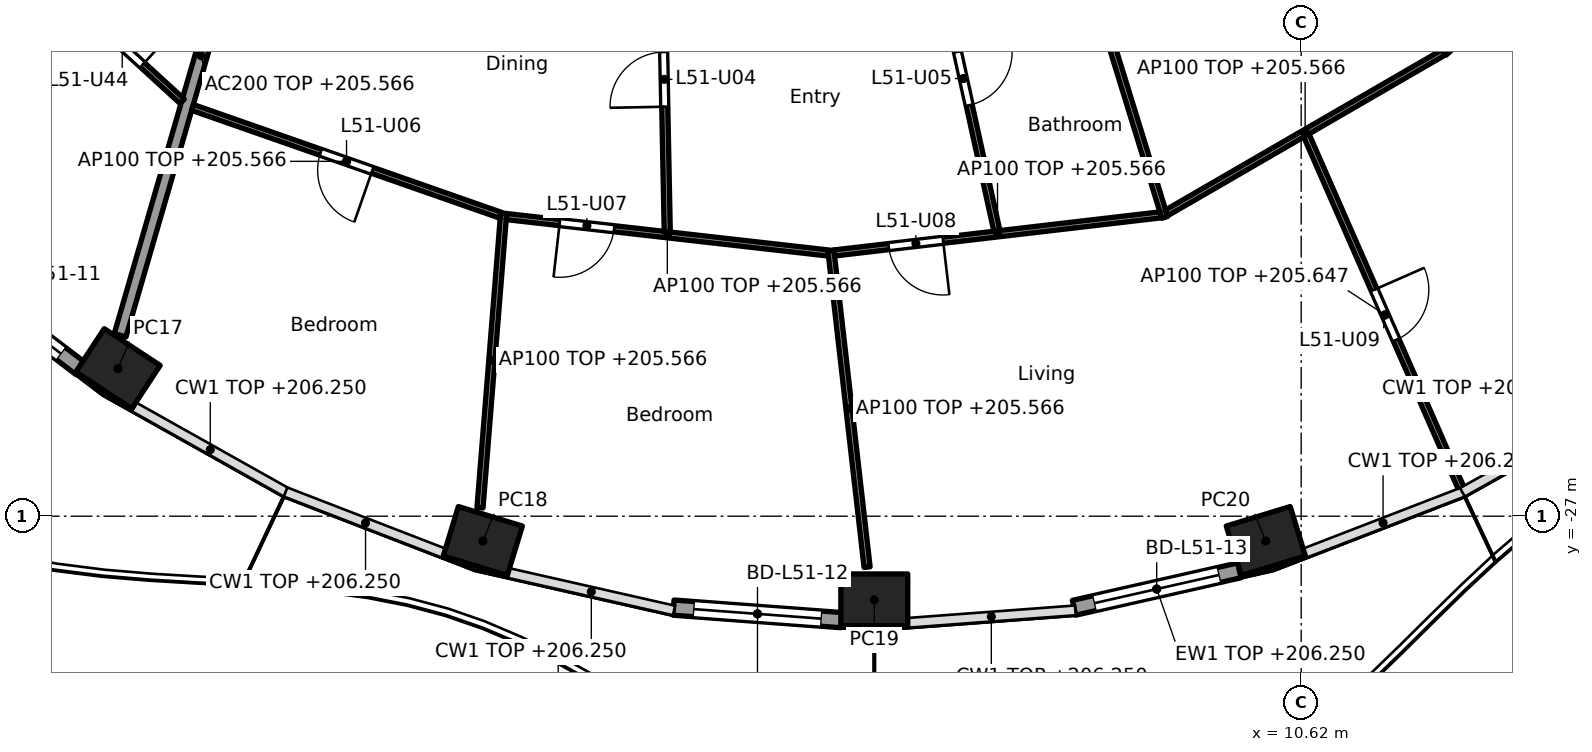
"""IFC4 building model, lengths in metres.
Left out: names, types, materials, properties, quantities, classifications, styles, units other than length and angle.
Written with IfcOpenShell. Run it as: python <this file> out.ifc"""

import sys

from ifc_helpers import new_model, si_unit, direction, frame, frame_2d, origin, origin_2d, place, context, subcontext, project, spatial, rectangle, hollow_rectangle, extrude, element, fill, save


model = new_model("IFC4")
c1 = context("Model", 3, precision=1e-05, world=origin(), true_north=direction((0.0, 1.0)))
c2 = subcontext(c1, "Body", "Model", "MODEL_VIEW")
j1 = project(units=[si_unit("LENGTHUNIT", "METRE"), si_unit("PLANEANGLEUNIT", "RADIAN")], contexts=[c1])
p1 = place(None, origin())
s1 = spatial("IfcSite", under=j1, at=p1, CompositionType="ELEMENT")
p2 = place(p1, origin())
s2 = spatial("IfcBuilding", under=s1, at=p2, CompositionType="ELEMENT")
p3 = place(p2, frame((0.0, 0.0, 202.9)))
s3 = spatial("IfcBuildingStorey", under=s2, at=p3, CompositionType="ELEMENT", Elevation=202.9)
for number, where, z_axis, x_axis in (
    (1, (-8.837, -24.573, 0.0), (0.0, 0.0, 1.0), (0.836, -0.549, 0.0)),
    (2, (-2.838, -27.408, 0.0), (0.0, 0.0, 1.0), (0.957, -0.292, 0.0)),
    (3, (3.6, -28.375, 0.0), (0.0, 0.0, 1.0), (1.0, 0.0, 0.0)),
    (4, (10.038, -27.408, 0.0), (0.0, 0.0, 1.0), (0.957, 0.292, 0.0)),
):
    element("IfcColumn", number, at=place(p3, frame(where, z_axis=z_axis, x_axis=x_axis)), inside=s3, PredefinedType="COLUMN", context=c2, shape_type="SweptSolid", body=[
        extrude(hollow_rectangle(XDim=1.1, YDim=0.85, WallThickness=0.036, at=origin_2d()), origin(), (0.0, 0.0, 1.0), 3.7),
    ])
p4 = place(p3, frame((-9.45, -24.574, 0.0), z_axis=(0.0, 0.0, 1.0), x_axis=(-0.796055733703, 0.60522332146, 0.0)))
e5 = element("IfcWall", 5, at=p4, inside=s3, PredefinedType="SOLIDWALL", context=c2, shape_type="SweptSolid", body=[
    extrude(rectangle(XDim=2.917, YDim=0.25, at=frame_2d((1.458, 0.0))), origin(), (0.0, 0.0, 1.0), 3.35),
])
p5 = place(p4, frame((0.408, 0.0, 0.0)))
e6 = element("IfcOpeningElement", 6, at=p5, cuts=e5, PredefinedType="OPENING", context=c2, shape_type="SweptSolid", body=[
    extrude(rectangle(XDim=2.1, YDim=2.4, at=frame_2d((1.05, 1.2))), frame((0.0, 0.135, 0.0), z_axis=(0.0, -1.0, 0.0), x_axis=(1.0, 0.0, 0.0)), (0.0, 0.0, 1.0), 0.27),
])
p6 = place(p3, frame((3.061, -28.709, 0.0), z_axis=(0.0, 0.0, 1.0), x_axis=(-0.997232064422, 0.074351931305, 0.0)))
e7 = element("IfcWall", 7, at=p6, inside=s3, PredefinedType="SOLIDWALL", context=c2, shape_type="SweptSolid", body=[
    extrude(rectangle(XDim=2.771, YDim=0.25, at=frame_2d((1.386, 0.0))), origin(), (0.0, 0.0, 1.0), 3.35),
])
p7 = place(p6, frame((0.336, 0.0, 0.0)))
e8 = element("IfcOpeningElement", 8, at=p7, cuts=e7, PredefinedType="OPENING", context=c2, shape_type="SweptSolid", body=[
    extrude(rectangle(XDim=2.1, YDim=2.4, at=frame_2d((1.05, 1.2))), frame((0.0, 0.135, 0.0), z_axis=(0.0, -1.0, 0.0), x_axis=(1.0, 0.0, 0.0)), (0.0, 0.0, 1.0), 0.27),
])
p8 = place(p3, frame((9.604, -27.891, 0.0), z_axis=(0.0, 0.0, 1.0), x_axis=(-0.975324329911, -0.220776926974, 0.0)))
e9 = element("IfcWall", 9, at=p8, inside=s3, PredefinedType="SOLIDWALL", context=c2, shape_type="SweptSolid", body=[
    extrude(rectangle(XDim=2.788, YDim=0.25, at=frame_2d((1.394, 0.0))), origin(), (0.0, 0.0, 1.0), 3.35),
])
p9 = place(p8, frame((0.344, 0.0, 0.0)))
e10 = element("IfcOpeningElement", 10, at=p9, cuts=e9, PredefinedType="OPENING", context=c2, shape_type="SweptSolid", body=[
    extrude(rectangle(XDim=2.1, YDim=2.4, at=frame_2d((1.05, 1.2))), frame((0.0, 0.135, 0.0), z_axis=(0.0, -1.0, 0.0), x_axis=(1.0, 0.0, 0.0)), (0.0, 0.0, 1.0), 0.27),
])
p10 = place(p3, frame((-6.137, -14.83, 0.0), z_axis=(0.0, 0.0, 1.0), x_axis=(-0.278461169897, -0.96044748782, 0.0)))
e11 = element("IfcWall", 11, at=p10, inside=s3, PredefinedType="PARTITIONING", context=c2, shape_type="SweptSolid", body=[
    extrude(rectangle(XDim=9.573, YDim=0.2, at=frame_2d((4.787, 0.0))), origin(), (0.0, 0.0, 1.0), 2.666),
])
p11 = place(p3, frame((-11.766, -16.535, 0.0), z_axis=(0.0, 0.0, 1.0), x_axis=(0.73807320557, -0.674720640872, 0.0)))
e12 = element("IfcWall", 12, at=p11, inside=s3, PredefinedType="PARTITIONING", context=c2, shape_type="SweptSolid", body=[
    extrude(rectangle(XDim=5.399, YDim=0.1, at=frame_2d((2.699, 0.0))), origin(), (0.0, 0.0, 1.0), 2.666),
])
p12 = place(p11, frame((3.612, 0.0, 0.0)))
e13 = element("IfcOpeningElement", 13, at=p12, cuts=e12, PredefinedType="OPENING", context=c2, shape_type="SweptSolid", body=[
    extrude(rectangle(XDim=0.9, YDim=2.1, at=frame_2d((0.45, 1.05))), frame((0.0, 0.06, 0.0), z_axis=(0.0, -1.0, 0.0), x_axis=(1.0, 0.0, 0.0)), (0.0, 0.0, 1.0), 0.12),
])
p13 = place(p3, frame((-7.613, -20.278, 0.0), z_axis=(0.0, 0.0, 1.0), x_axis=(0.94391294884, -0.330194404878, 0.0)))
e14 = element("IfcWall", 14, at=p13, inside=s3, PredefinedType="PARTITIONING", context=c2, shape_type="SweptSolid", body=[
    extrude(rectangle(XDim=5.367, YDim=0.1, at=frame_2d((2.684, 0.0))), origin(), (0.0, 0.0, 1.0), 2.666),
])
p14 = place(p13, frame((2.234, 0.0, 0.0)))
e15 = element("IfcOpeningElement", 15, at=p14, cuts=e14, PredefinedType="OPENING", context=c2, shape_type="SweptSolid", body=[
    extrude(rectangle(XDim=0.9, YDim=2.1, at=frame_2d((0.45, 1.05))), frame((0.0, 0.06, 0.0), z_axis=(0.0, -1.0, 0.0), x_axis=(1.0, 0.0, 0.0)), (0.0, 0.0, 1.0), 0.12),
])
p15 = place(p3, frame((-2.495, -22.017, 0.0), z_axis=(0.0, 0.0, 1.0), x_axis=(-0.080150660566, -0.99678276049, 0.0)))
e16 = element("IfcWall", 16, at=p15, inside=s3, PredefinedType="PARTITIONING", context=c2, shape_type="SweptSolid", body=[
    extrude(rectangle(XDim=4.858, YDim=0.1, at=frame_2d((2.429, 0.0))), origin(), (0.0, 0.0, 1.0), 2.666),
])
p16 = place(p3, frame((-2.449, -22.073, 0.0), z_axis=(0.0, 0.0, 1.0), x_axis=(0.993660315081, -0.112424099879, 0.0)))
e17 = element("IfcWall", 17, at=p16, inside=s3, PredefinedType="PARTITIONING", context=c2, shape_type="SweptSolid", body=[
    extrude(rectangle(XDim=5.325, YDim=0.1, at=frame_2d((2.662, 0.0))), origin(), (0.0, 0.0, 1.0), 2.666),
])
p17 = place(p16, frame((0.881, 0.0, 0.0)))
e18 = element("IfcOpeningElement", 18, at=p17, cuts=e17, PredefinedType="OPENING", context=c2, shape_type="SweptSolid", body=[
    extrude(rectangle(XDim=0.9, YDim=2.1, at=frame_2d((0.45, 1.05))), frame((0.0, 0.06, 0.0), z_axis=(0.0, -1.0, 0.0), x_axis=(1.0, 0.0, 0.0)), (0.0, 0.0, 1.0), 0.12),
])
p18 = place(p3, frame((0.002, -12.665, 0.0), z_axis=(0.0, 0.0, 1.0), x_axis=(0.019992969345, -0.999800120613, 0.0)))
e19 = element("IfcWall", 19, at=p18, inside=s3, PredefinedType="PARTITIONING", context=c2, shape_type="SweptSolid", body=[
    extrude(rectangle(XDim=9.659, YDim=0.1, at=frame_2d((4.83, 0.0))), origin(), (0.0, 0.0, 1.0), 2.515),
])
p19 = place(p18, frame((1.873, 0.0, 0.0)))
e20 = element("IfcOpeningElement", 20, at=p19, cuts=e19, PredefinedType="OPENING", context=c2, shape_type="SweptSolid", body=[
    extrude(rectangle(XDim=0.9, YDim=2.1, at=frame_2d((0.45, 1.05))), frame((0.0, 0.06, 0.0), z_axis=(0.0, -1.0, 0.0), x_axis=(1.0, 0.0, 0.0)), (0.0, 0.0, 1.0), 0.12),
])
p20 = place(p18, frame((6.703, 0.0, 0.0)))
e21 = element("IfcOpeningElement", 21, at=p20, cuts=e19, PredefinedType="OPENING", context=c2, shape_type="SweptSolid", body=[
    extrude(rectangle(XDim=0.9, YDim=2.1, at=frame_2d((0.45, 1.05))), frame((0.0, 0.06, 0.0), z_axis=(0.0, -1.0, 0.0), x_axis=(1.0, 0.0, 0.0)), (0.0, 0.0, 1.0), 0.12),
])
p21 = place(p3, frame((2.885, -22.627, 0.0), z_axis=(0.0, 0.0, 1.0), x_axis=(0.113634556485, -0.993522615531, 0.0)))
e22 = element("IfcWall", 22, at=p21, inside=s3, PredefinedType="PARTITIONING", context=c2, shape_type="SweptSolid", body=[
    extrude(rectangle(XDim=5.244, YDim=0.1, at=frame_2d((2.622, 0.0))), origin(), (0.0, 0.0, 1.0), 2.666),
])
p22 = place(p3, frame((2.941, -22.671, 0.0), z_axis=(0.0, 0.0, 1.0), x_axis=(0.993245806382, 0.1160291692, 0.0)))
e23 = element("IfcWall", 23, at=p22, inside=s3, PredefinedType="PARTITIONING", context=c2, shape_type="SweptSolid", body=[
    extrude(rectangle(XDim=5.408, YDim=0.1, at=frame_2d((2.704, 0.0))), origin(), (0.0, 0.0, 1.0), 2.666),
])
p23 = place(p22, frame((0.902, 0.0, 0.0)))
e24 = element("IfcOpeningElement", 24, at=p23, cuts=e23, PredefinedType="OPENING", context=c2, shape_type="SweptSolid", body=[
    extrude(rectangle(XDim=0.9, YDim=2.1, at=frame_2d((0.45, 1.05))), frame((0.0, 0.06, 0.0), z_axis=(0.0, -1.0, 0.0), x_axis=(1.0, 0.0, 0.0)), (0.0, 0.0, 1.0), 0.12),
])
p24 = place(p3, frame((3.491, -12.662, 0.0), z_axis=(0.0, 0.0, 1.0), x_axis=(0.215082442833, -0.976595895335, 0.0)))
e25 = element("IfcWall", 25, at=p24, inside=s3, PredefinedType="PARTITIONING", context=c2, shape_type="SweptSolid", body=[
    extrude(rectangle(XDim=9.878, YDim=0.1, at=frame_2d((4.939, 0.0))), origin(), (0.0, 0.0, 1.0), 2.515),
])
p25 = place(p24, frame((0.35, 0.0, 0.0)))
e26 = element("IfcOpeningElement", 26, at=p25, cuts=e25, PredefinedType="OPENING", context=c2, shape_type="SweptSolid", body=[
    extrude(rectangle(XDim=0.9, YDim=2.1, at=frame_2d((0.45, 1.05))), frame((0.0, 0.06, 0.0), z_axis=(0.0, -1.0, 0.0), x_axis=(1.0, 0.0, 0.0)), (0.0, 0.0, 1.0), 0.12),
])
p26 = place(p24, frame((6.861, 0.0, 0.0)))
e27 = element("IfcOpeningElement", 27, at=p26, cuts=e25, PredefinedType="OPENING", context=c2, shape_type="SweptSolid", body=[
    extrude(rectangle(XDim=0.9, YDim=2.1, at=frame_2d((0.45, 1.05))), frame((0.0, 0.06, 0.0), z_axis=(0.0, -1.0, 0.0), x_axis=(1.0, 0.0, 0.0)), (0.0, 0.0, 1.0), 0.12),
])
p27 = place(p3, frame((6.138, -14.83, 0.0), z_axis=(0.0, 0.0, 1.0), x_axis=(0.294822274121, -0.955552105687, 0.0)))
e28 = element("IfcWall", 28, at=p27, inside=s3, PredefinedType="PARTITIONING", context=c2, shape_type="SweptSolid", body=[
    extrude(rectangle(XDim=7.594, YDim=0.1, at=frame_2d((3.797, 0.0))), origin(), (0.0, 0.0, 1.0), 3.35),
])
p28 = place(p3, frame((8.405, -22.013, 0.0), z_axis=(0.0, 0.0, 1.0), x_axis=(0.865277177388, 0.501293732547, 0.0)))
e29 = element("IfcWall", 29, at=p28, inside=s3, PredefinedType="PARTITIONING", context=c2, shape_type="SweptSolid", body=[
    extrude(rectangle(XDim=5.27, YDim=0.1, at=frame_2d((2.635, 0.0))), origin(), (0.0, 0.0, 1.0), 2.666),
])
p29 = place(p3, frame((10.705, -20.738, 0.0), z_axis=(0.0, 0.0, 1.0), x_axis=(0.401740633891, -0.915753494714, 0.0)))
e30 = element("IfcWall", 30, at=p29, inside=s3, PredefinedType="PARTITIONING", context=c2, shape_type="SweptSolid", body=[
    extrude(rectangle(XDim=6.445, YDim=0.1, at=frame_2d((3.223, 0.0))), origin(), (0.0, 0.0, 1.0), 2.747),
])
p30 = place(p29, frame((2.773, 0.0, 0.0)))
e31 = element("IfcOpeningElement", 31, at=p30, cuts=e30, PredefinedType="OPENING", context=c2, shape_type="SweptSolid", body=[
    extrude(rectangle(XDim=0.9, YDim=2.1, at=frame_2d((0.45, 1.05))), frame((0.0, 0.06, 0.0), z_axis=(0.0, -1.0, 0.0), x_axis=(1.0, 0.0, 0.0)), (0.0, 0.0, 1.0), 0.12),
])
p31 = place(p3, frame((12.971, -19.38, 0.0), z_axis=(0.0, 0.0, 1.0), x_axis=(0.742768881471, 0.669547898748, 0.0)))
e32 = element("IfcWall", 32, at=p31, inside=s3, PredefinedType="PARTITIONING", context=c2, shape_type="SweptSolid", body=[
    extrude(rectangle(XDim=5.642, YDim=0.1, at=frame_2d((2.821, 0.0))), origin(), (0.0, 0.0, 1.0), 2.666),
])
p32 = place(p31, frame((1.01, 0.0, 0.0)))
e33 = element("IfcOpeningElement", 33, at=p32, cuts=e32, PredefinedType="OPENING", context=c2, shape_type="SweptSolid", body=[
    extrude(rectangle(XDim=0.9, YDim=2.1, at=frame_2d((0.45, 1.05))), frame((0.0, 0.06, 0.0), z_axis=(0.0, -1.0, 0.0), x_axis=(1.0, 0.0, 0.0)), (0.0, 0.0, 1.0), 0.12),
])
p33 = place(p31, frame((3.806, 0.0, 0.0)))
e34 = element("IfcOpeningElement", 34, at=p33, cuts=e32, PredefinedType="OPENING", context=c2, shape_type="SweptSolid", body=[
    extrude(rectangle(XDim=0.9, YDim=2.1, at=frame_2d((0.45, 1.05))), frame((0.0, 0.06, 0.0), z_axis=(0.0, -1.0, 0.0), x_axis=(1.0, 0.0, 0.0)), (0.0, 0.0, 1.0), 0.12),
])
p34 = place(p5, origin())
e35 = element("IfcDoor", 35, at=p34, inside=s3, OperationType="SLIDING_TO_LEFT", PredefinedType="DOOR", context=c2, shape_type="SweptSolid", body=[
    extrude(rectangle(XDim=2.1, YDim=2.4, at=frame_2d((1.05, 1.2))), frame((0.0, 0.025, 0.0), z_axis=(0.0, -1.0, 0.0), x_axis=(1.0, 0.0, 0.0)), (0.0, 0.0, 1.0), 0.05),
])
fill(e6, e35)
p35 = place(p7, origin())
e36 = element("IfcDoor", 36, at=p35, inside=s3, OperationType="SLIDING_TO_LEFT", PredefinedType="DOOR", context=c2, shape_type="SweptSolid", body=[
    extrude(rectangle(XDim=2.1, YDim=2.4, at=frame_2d((1.05, 1.2))), frame((0.0, 0.025, 0.0), z_axis=(0.0, -1.0, 0.0), x_axis=(1.0, 0.0, 0.0)), (0.0, 0.0, 1.0), 0.05),
])
fill(e8, e36)
p36 = place(p9, origin())
e37 = element("IfcDoor", 37, at=p36, inside=s3, OperationType="SLIDING_TO_LEFT", PredefinedType="DOOR", context=c2, shape_type="SweptSolid", body=[
    extrude(rectangle(XDim=2.1, YDim=2.4, at=frame_2d((1.05, 1.2))), frame((0.0, 0.025, 0.0), z_axis=(0.0, -1.0, 0.0), x_axis=(1.0, 0.0, 0.0)), (0.0, 0.0, 1.0), 0.05),
])
fill(e10, e37)
p37 = place(p20, frame((0.9, 0.0, 0.0), x_axis=(-1.0, 0.0, 0.0)))
e38 = element("IfcDoor", 38, at=p37, inside=s3, OperationType="SINGLE_SWING_LEFT", PredefinedType="DOOR", context=c2, shape_type="SweptSolid", body=[
    extrude(rectangle(XDim=0.9, YDim=2.1, at=frame_2d((0.45, 1.05))), frame((0.0, 0.025, 0.0), z_axis=(0.0, -1.0, 0.0), x_axis=(1.0, 0.0, 0.0)), (0.0, 0.0, 1.0), 0.05),
])
fill(e21, e38)
p38 = place(p26, origin())
e39 = element("IfcDoor", 39, at=p38, inside=s3, OperationType="SINGLE_SWING_LEFT", PredefinedType="DOOR", context=c2, shape_type="SweptSolid", body=[
    extrude(rectangle(XDim=0.9, YDim=2.1, at=frame_2d((0.45, 1.05))), frame((0.0, 0.025, 0.0), z_axis=(0.0, -1.0, 0.0), x_axis=(1.0, 0.0, 0.0)), (0.0, 0.0, 1.0), 0.05),
])
fill(e27, e39)
p39 = place(p14, frame((0.9, 0.0, 0.0), x_axis=(-1.0, 0.0, 0.0)))
e40 = element("IfcDoor", 40, at=p39, inside=s3, OperationType="SINGLE_SWING_LEFT", PredefinedType="DOOR", context=c2, shape_type="SweptSolid", body=[
    extrude(rectangle(XDim=0.9, YDim=2.1, at=frame_2d((0.45, 1.05))), frame((0.0, 0.025, 0.0), z_axis=(0.0, -1.0, 0.0), x_axis=(1.0, 0.0, 0.0)), (0.0, 0.0, 1.0), 0.05),
])
fill(e15, e40)
p40 = place(p17, frame((0.9, 0.0, 0.0), x_axis=(-1.0, 0.0, 0.0)))
e41 = element("IfcDoor", 41, at=p40, inside=s3, OperationType="SINGLE_SWING_RIGHT", PredefinedType="DOOR", context=c2, shape_type="SweptSolid", body=[
    extrude(rectangle(XDim=0.9, YDim=2.1, at=frame_2d((0.45, 1.05))), frame((0.0, 0.025, 0.0), z_axis=(0.0, -1.0, 0.0), x_axis=(1.0, 0.0, 0.0)), (0.0, 0.0, 1.0), 0.05),
])
fill(e18, e41)
p41 = place(p23, frame((0.9, 0.0, 0.0), x_axis=(-1.0, 0.0, 0.0)))
e42 = element("IfcDoor", 42, at=p41, inside=s3, OperationType="SINGLE_SWING_LEFT", PredefinedType="DOOR", context=c2, shape_type="SweptSolid", body=[
    extrude(rectangle(XDim=0.9, YDim=2.1, at=frame_2d((0.45, 1.05))), frame((0.0, 0.025, 0.0), z_axis=(0.0, -1.0, 0.0), x_axis=(1.0, 0.0, 0.0)), (0.0, 0.0, 1.0), 0.05),
])
fill(e24, e42)
p42 = place(p30, origin())
e43 = element("IfcDoor", 43, at=p42, inside=s3, OperationType="SINGLE_SWING_LEFT", PredefinedType="DOOR", context=c2, shape_type="SweptSolid", body=[
    extrude(rectangle(XDim=0.9, YDim=2.1, at=frame_2d((0.45, 1.05))), frame((0.0, 0.025, 0.0), z_axis=(0.0, -1.0, 0.0), x_axis=(1.0, 0.0, 0.0)), (0.0, 0.0, 1.0), 0.05),
])
fill(e31, e43)
p43 = place(p12, origin())
e44 = element("IfcDoor", 44, at=p43, inside=s3, OperationType="SINGLE_SWING_RIGHT", PredefinedType="DOOR", context=c2, shape_type="SweptSolid", body=[
    extrude(rectangle(XDim=0.9, YDim=2.1, at=frame_2d((0.45, 1.05))), frame((0.0, 0.025, 0.0), z_axis=(0.0, -1.0, 0.0), x_axis=(1.0, 0.0, 0.0)), (0.0, 0.0, 1.0), 0.05),
])
fill(e13, e44)
save(model, sys.argv[1])
